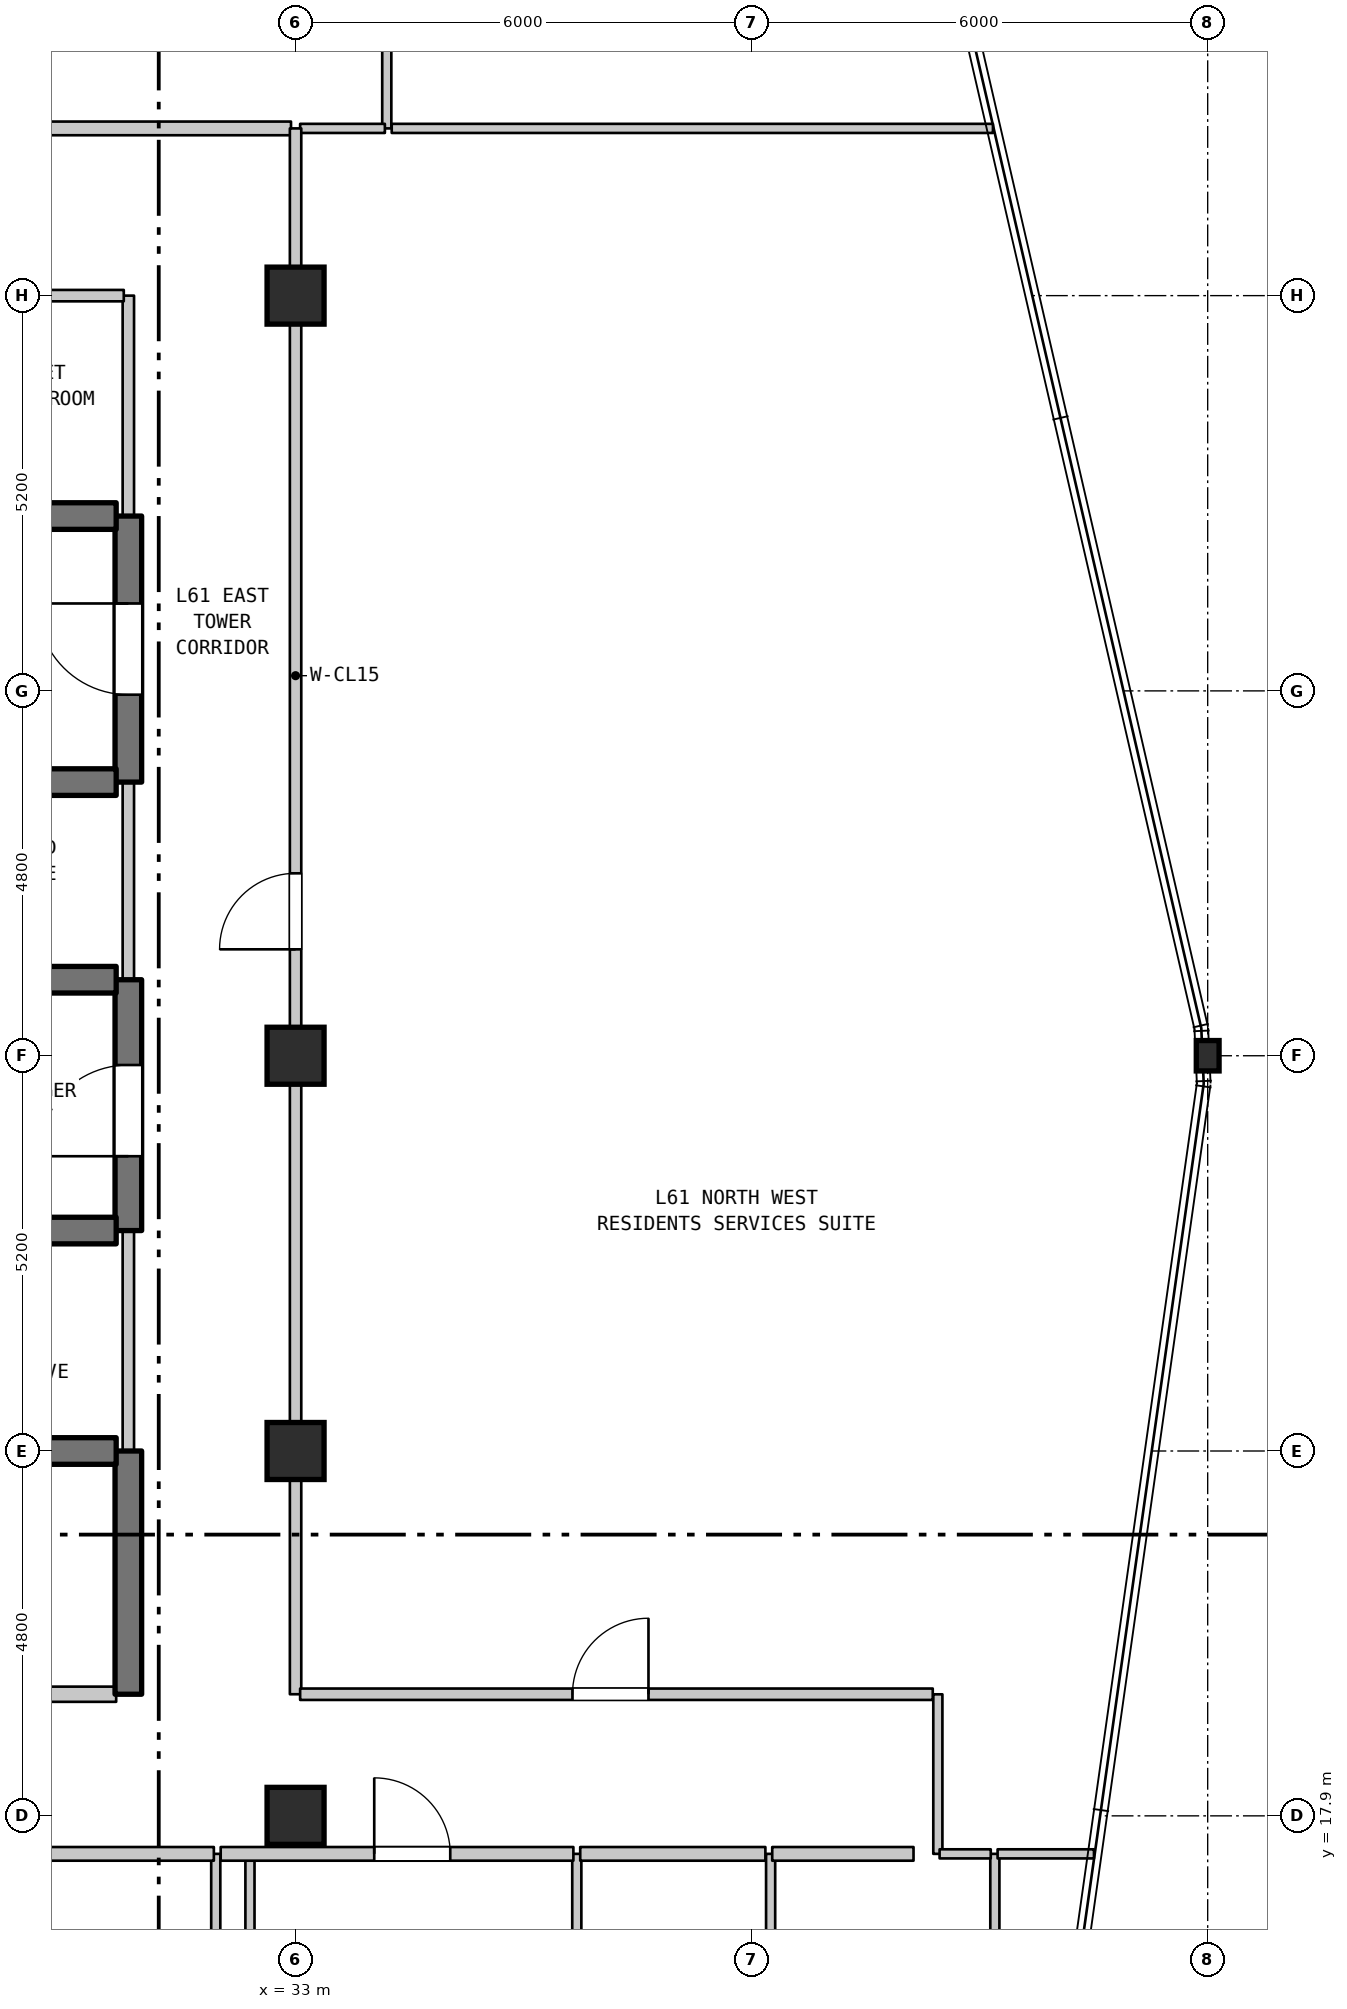
"""IFC4 building model, lengths in metres.
Left out: names, types, materials, properties, quantities, classifications, styles, units other than length and angle.
Written with IfcOpenShell. Run it as: python <this file> out.ifc"""

import sys

from ifc_helpers import new_model, si_unit, direction, frame, frame_2d, origin, origin_2d, place, context, subcontext, project, spatial, rectangle, i_section, extrude, element, fill, save


model = new_model("IFC4")
c1 = context("Model", 3, precision=1e-05, world=origin(), true_north=direction((0.0, 1.0)))
c2 = subcontext(c1, "Body", "Model", "MODEL_VIEW")
j1 = project(units=[si_unit("LENGTHUNIT", "METRE"), si_unit("PLANEANGLEUNIT", "RADIAN")], contexts=[c1])
p1 = place(None, origin())
s1 = spatial("IfcSite", under=j1, at=p1, CompositionType="ELEMENT")
p2 = place(p1, origin())
s2 = spatial("IfcBuilding", under=s1, at=p2, CompositionType="ELEMENT")
p3 = place(p2, frame((0.0, 0.0, 247.3)))
s3 = spatial("IfcBuildingStorey", under=s2, at=p3, CompositionType="ELEMENT", Elevation=247.3)
for number, where, z_axis, x_axis in (
    (1, (33.0, 17.9, 0.0), (0.0, 0.0, 1.0), (1.0, 0.0, 0.0)),
    (2, (33.0, 22.7, 0.0), (0.0, 0.0, 1.0), (1.0, 0.0, 0.0)),
    (3, (33.0, 27.9, 0.0), (0.0, 0.0, 1.0), (1.0, 0.0, 0.0)),
    (4, (33.0, 37.9, 0.0), (0.0, 0.0, 1.0), (1.0, 0.0, 0.0)),
):
    element("IfcColumn", number, at=place(p3, frame(where, z_axis=z_axis, x_axis=x_axis)), inside=s3, PredefinedType="COLUMN", context=c2, shape_type="SweptSolid", body=[
        extrude(rectangle(XDim=0.75, YDim=0.75, at=origin_2d()), origin(), (0.0, 0.0, 1.0), 3.7),
    ])
p4 = place(p3, frame((45.0, 27.9, 0.0), z_axis=(0.0, 0.0, 1.0), x_axis=(1.0, 0.0, 0.0)))
e5 = element("IfcColumn", 5, at=p4, inside=s3, PredefinedType="COLUMN", context=c2, shape_type="SweptSolid", body=[
    extrude(i_section(OverallWidth=0.3, OverallDepth=0.4, WebThickness=0.013, FlangeThickness=0.024, FilletRadius=0.027, at=origin_2d()), origin(), (0.0, 0.0, 1.0), 3.7),
])
p5 = place(p3, frame((30.8, 19.5, 0.0), z_axis=(0.0, 0.0, 1.0), x_axis=(0.0, 1.0, 0.0)))
e6 = element("IfcWall", 6, at=p5, inside=s3, PredefinedType="SHEAR", context=c2, shape_type="SweptSolid", body=[
    extrude(rectangle(XDim=3.2, YDim=0.35, at=frame_2d((1.6, 0.0))), origin(), (0.0, 0.0, 1.0), 3.39),
])
p6 = place(p3, frame((30.8, 22.7, 0.0), z_axis=(0.0, 0.0, 1.0), x_axis=(0.0, 1.0, 0.0)))
e7 = element("IfcWall", 7, at=p6, inside=s3, PredefinedType="STANDARD", context=c2, shape_type="SweptSolid", body=[
    extrude(rectangle(XDim=2.9, YDim=0.15, at=frame_2d((1.45, 0.0))), origin(), (0.0, 0.0, 1.0), 3.39),
])
p7 = place(p3, frame((30.8, 25.6, 0.0), z_axis=(0.0, 0.0, 1.0), x_axis=(0.0, 1.0, 0.0)))
e8 = element("IfcWall", 8, at=p7, inside=s3, PredefinedType="SHEAR", context=c2, shape_type="SweptSolid", body=[
    extrude(rectangle(XDim=3.3, YDim=0.35, at=frame_2d((1.65, 0.0))), origin(), (0.0, 0.0, 1.0), 3.39),
])
p8 = place(p7, frame((0.978, 0.0, 0.0)))
e9 = element("IfcOpeningElement", 9, at=p8, cuts=e8, PredefinedType="OPENING", context=c2, shape_type="SweptSolid", body=[
    extrude(rectangle(XDim=1.2, YDim=2.2, at=frame_2d((0.6, 1.1))), frame((0.0, 0.185, 0.0), z_axis=(0.0, -1.0, 0.0), x_axis=(1.0, 0.0, 0.0)), (0.0, 0.0, 1.0), 0.37),
])
p9 = place(p3, frame((30.8, 28.9, 0.0), z_axis=(0.0, 0.0, 1.0), x_axis=(0.0, 1.0, 0.0)))
e10 = element("IfcWall", 10, at=p9, inside=s3, PredefinedType="STANDARD", context=c2, shape_type="SweptSolid", body=[
    extrude(rectangle(XDim=2.6, YDim=0.15, at=frame_2d((1.3, 0.0))), origin(), (0.0, 0.0, 1.0), 3.39),
])
p10 = place(p3, frame((30.8, 31.5, 0.0), z_axis=(0.0, 0.0, 1.0), x_axis=(0.0, 1.0, 0.0)))
e11 = element("IfcWall", 11, at=p10, inside=s3, PredefinedType="SHEAR", context=c2, shape_type="SweptSolid", body=[
    extrude(rectangle(XDim=3.5, YDim=0.35, at=frame_2d((1.75, 0.0))), origin(), (0.0, 0.0, 1.0), 3.39),
])
p11 = place(p10, frame((1.15, 0.0, 0.0)))
e12 = element("IfcOpeningElement", 12, at=p11, cuts=e11, PredefinedType="OPENING", context=c2, shape_type="SweptSolid", body=[
    extrude(rectangle(XDim=1.2, YDim=2.2, at=frame_2d((0.6, 1.1))), frame((0.0, 0.185, 0.0), z_axis=(0.0, -1.0, 0.0), x_axis=(1.0, 0.0, 0.0)), (0.0, 0.0, 1.0), 0.37),
])
p12 = place(p3, frame((30.8, 35.0, 0.0), z_axis=(0.0, 0.0, 1.0), x_axis=(0.0, 1.0, 0.0)))
e13 = element("IfcWall", 13, at=p12, inside=s3, PredefinedType="STANDARD", context=c2, shape_type="SweptSolid", body=[
    extrude(rectangle(XDim=2.9, YDim=0.15, at=frame_2d((1.45, 0.0))), origin(), (0.0, 0.0, 1.0), 3.39),
])
p13 = place(p3, frame((31.95, 13.62, 0.0), z_axis=(0.0, 0.0, 1.0), x_axis=(0.0, 1.0, 0.0)))
e14 = element("IfcWall", 14, at=p13, inside=s3, PredefinedType="PARTITIONING", context=c2, shape_type="SweptSolid", body=[
    extrude(rectangle(XDim=3.78, YDim=0.12, at=frame_2d((1.89, 0.0))), origin(), (0.0, 0.0, 1.0), 3.39),
])
p14 = place(p3, frame((32.4, 6.71, 0.0), z_axis=(0.0, 0.0, 1.0), x_axis=(0.0, 1.0, 0.0)))
e15 = element("IfcWall", 15, at=p14, inside=s3, PredefinedType="PARTITIONING", context=c2, shape_type="SweptSolid", body=[
    extrude(rectangle(XDim=10.69, YDim=0.12, at=frame_2d((5.345, 0.0))), origin(), (0.0, 0.0, 1.0), 3.39),
])
p15 = place(p3, frame((33.0, 19.5, 0.0), z_axis=(0.0, 0.0, 1.0), x_axis=(0.0, 1.0, 0.0)))
e16 = element("IfcWall", 16, at=p15, inside=s3, PredefinedType="STANDARD", context=c2, shape_type="SweptSolid", body=[
    extrude(rectangle(XDim=8.4, YDim=0.15, at=frame_2d((4.2, 0.0))), origin(), (0.0, 0.0, 1.0), 3.1),
])
p16 = place(p3, frame((34.2, 40.1, 0.0), z_axis=(0.0, 0.0, 1.0), x_axis=(0.0, 1.0, 0.0)))
e17 = element("IfcWall", 17, at=p16, inside=s3, PredefinedType="PARTITIONING", context=c2, shape_type="SweptSolid", body=[
    extrude(rectangle(XDim=13.79, YDim=0.12, at=frame_2d((6.895, 0.0))), origin(), (0.0, 0.0, 1.0), 3.39),
])
p17 = place(p16, frame((1.852, 0.0, 0.0)))
e18 = element("IfcOpeningElement", 18, at=p17, cuts=e17, PredefinedType="OPENING", context=c2, shape_type="SweptSolid", body=[
    extrude(rectangle(XDim=0.9, YDim=2.15, at=frame_2d((0.45, 1.075))), frame((0.0, 0.07, 0.0), z_axis=(0.0, -1.0, 0.0), x_axis=(1.0, 0.0, 0.0)), (0.0, 0.0, 1.0), 0.14),
])
p18 = place(p16, frame((6.45, 0.0, 0.0)))
e19 = element("IfcOpeningElement", 19, at=p18, cuts=e17, PredefinedType="OPENING", context=c2, shape_type="SweptSolid", body=[
    extrude(rectangle(XDim=0.9, YDim=2.15, at=frame_2d((0.45, 1.075))), frame((0.0, 0.07, 0.0), z_axis=(0.0, -1.0, 0.0), x_axis=(1.0, 0.0, 0.0)), (0.0, 0.0, 1.0), 0.14),
])
p19 = place(p16, frame((10.898, 0.0, 0.0)))
e20 = element("IfcOpeningElement", 20, at=p19, cuts=e17, PredefinedType="OPENING", context=c2, shape_type="SweptSolid", body=[
    extrude(rectangle(XDim=0.9, YDim=2.15, at=frame_2d((0.45, 1.075))), frame((0.0, 0.07, 0.0), z_axis=(0.0, -1.0, 0.0), x_axis=(1.0, 0.0, 0.0)), (0.0, 0.0, 1.0), 0.14),
])
for number, where, z_axis, x_axis in (
    (21, (36.7, 13.62, 0.0), (0.0, 0.0, 1.0), (0.0, 1.0, 0.0)),
    (22, (39.25, 13.62, 0.0), (0.0, 0.0, 1.0), (0.0, 1.0, 0.0)),
):
    element("IfcWall", number, at=place(p3, frame(where, z_axis=z_axis, x_axis=x_axis)), inside=s3, PredefinedType="PARTITIONING", context=c2, shape_type="SweptSolid", body=[
        extrude(rectangle(XDim=3.78, YDim=0.12, at=frame_2d((1.89, 0.0))), origin(), (0.0, 0.0, 1.0), 3.39),
    ])
p20 = place(p3, frame((41.45, 17.4, 0.0), z_axis=(0.0, 0.0, 1.0), x_axis=(0.0, 1.0, 0.0)))
e23 = element("IfcWall", 23, at=p20, inside=s3, PredefinedType="PARTITIONING", context=c2, shape_type="SweptSolid", body=[
    extrude(rectangle(XDim=2.099, YDim=0.12, at=frame_2d((1.05, 0.0))), origin(), (0.0, 0.0, 1.0), 3.39),
])
p21 = place(p3, frame((42.2, 13.62, 0.0), z_axis=(0.0, 0.0, 1.0), x_axis=(0.0, 1.0, 0.0)))
e24 = element("IfcWall", 24, at=p21, inside=s3, PredefinedType="PARTITIONING", context=c2, shape_type="SweptSolid", body=[
    extrude(rectangle(XDim=3.78, YDim=0.12, at=frame_2d((1.89, 0.0))), origin(), (0.0, 0.0, 1.0), 3.39),
])
p22 = place(p3, frame((28.424, 17.4, 0.0), z_axis=(0.0, 0.0, 1.0), x_axis=(1.0, 0.0, 0.0)))
e25 = element("IfcWall", 25, at=p22, inside=s3, PredefinedType="STANDARD", context=c2, shape_type="SweptSolid", body=[
    extrude(rectangle(XDim=3.501, YDim=0.18, at=frame_2d((1.75, 0.0))), origin(), (0.0, 0.0, 1.0), 3.39),
])
p23 = place(p3, frame((32.015, 17.4, 0.0), z_axis=(0.0, 0.0, 1.0), x_axis=(1.0, 0.0, 0.0)))
e26 = element("IfcWall", 26, at=p23, inside=s3, PredefinedType="STANDARD", context=c2, shape_type="SweptSolid", body=[
    extrude(rectangle(XDim=4.64, YDim=0.18, at=frame_2d((2.32, 0.0))), origin(), (0.0, 0.0, 1.0), 3.39),
])
p24 = place(p23, frame((2.02, 0.0, 0.0)))
e27 = element("IfcOpeningElement", 27, at=p24, cuts=e26, PredefinedType="OPENING", context=c2, shape_type="SweptSolid", body=[
    extrude(rectangle(XDim=1.0, YDim=2.15, at=frame_2d((0.5, 1.075))), frame((0.0, 0.1, 0.0), z_axis=(0.0, -1.0, 0.0), x_axis=(1.0, 0.0, 0.0)), (0.0, 0.0, 1.0), 0.2),
])
p25 = place(p3, frame((36.745, 17.4, 0.0), z_axis=(0.0, 0.0, 1.0), x_axis=(1.0, 0.0, 0.0)))
e28 = element("IfcWall", 28, at=p25, inside=s3, PredefinedType="STANDARD", context=c2, shape_type="SweptSolid", body=[
    extrude(rectangle(XDim=2.436, YDim=0.18, at=frame_2d((1.218, 0.0))), origin(), (0.0, 0.0, 1.0), 3.39),
])
p26 = place(p3, frame((39.271, 17.4, 0.0), z_axis=(0.0, 0.0, 1.0), x_axis=(1.0, 0.0, 0.0)))
e29 = element("IfcWall", 29, at=p26, inside=s3, PredefinedType="STANDARD", context=c2, shape_type="SweptSolid", body=[
    extrude(rectangle(XDim=1.859, YDim=0.18, at=frame_2d((0.929, 0.0))), origin(), (0.0, 0.0, 1.0), 3.39),
])
p27 = place(p3, frame((41.473, 17.4, 0.0), z_axis=(0.0, 0.0, 1.0), x_axis=(1.0, 0.0, 0.0)))
e30 = element("IfcWall", 30, at=p27, inside=s3, PredefinedType="PARTITIONING", context=c2, shape_type="SweptSolid", body=[
    extrude(rectangle(XDim=0.673, YDim=0.12, at=frame_2d((0.336, 0.0))), origin(), (0.0, 0.0, 1.0), 3.39),
])
p28 = place(p3, frame((42.236, 17.4, 0.0), z_axis=(0.0, 0.0, 1.0), x_axis=(1.0, 0.0, 0.0)))
e31 = element("IfcWall", 31, at=p28, inside=s3, PredefinedType="PARTITIONING", context=c2, shape_type="SweptSolid", body=[
    extrude(rectangle(XDim=1.268, YDim=0.12, at=frame_2d((0.634, 0.0))), origin(), (0.0, 0.0, 1.0), 3.39),
])
p29 = place(p3, frame((25.985, 19.5, 0.0), z_axis=(0.0, 0.0, 1.0), x_axis=(1.0, 0.0, 0.0)))
e32 = element("IfcWall", 32, at=p29, inside=s3, PredefinedType="STANDARD", context=c2, shape_type="SweptSolid", body=[
    extrude(rectangle(XDim=4.655, YDim=0.2, at=frame_2d((2.327, 0.0))), origin(), (0.0, 0.0, 1.0), 3.39),
])
p30 = place(p29, frame((1.845, 0.0, 0.0)))
e33 = element("IfcOpeningElement", 33, at=p30, cuts=e32, PredefinedType="OPENING", context=c2, shape_type="SweptSolid", body=[
    extrude(rectangle(XDim=0.9, YDim=2.15, at=frame_2d((0.45, 1.075))), frame((0.0, 0.11, 0.0), z_axis=(0.0, -1.0, 0.0), x_axis=(1.0, 0.0, 0.0)), (0.0, 0.0, 1.0), 0.22),
])
p31 = place(p3, frame((33.06, 19.5, 0.0), z_axis=(0.0, 0.0, 1.0), x_axis=(1.0, 0.0, 0.0)))
e34 = element("IfcWall", 34, at=p31, inside=s3, PredefinedType="STANDARD", context=c2, shape_type="SweptSolid", body=[
    extrude(rectangle(XDim=8.323, YDim=0.15, at=frame_2d((4.162, 0.0))), origin(), (0.0, 0.0, 1.0), 3.39),
])
p32 = place(p31, frame((3.583, 0.0, 0.0)))
e35 = element("IfcOpeningElement", 35, at=p32, cuts=e34, PredefinedType="OPENING", context=c2, shape_type="SweptSolid", body=[
    extrude(rectangle(XDim=1.0, YDim=2.15, at=frame_2d((0.5, 1.075))), frame((0.0, 0.085, 0.0), z_axis=(0.0, -1.0, 0.0), x_axis=(1.0, 0.0, 0.0)), (0.0, 0.0, 1.0), 0.17),
])
p33 = place(p3, frame((27.46, 22.7, 0.0), z_axis=(0.0, 0.0, 1.0), x_axis=(1.0, 0.0, 0.0)))
e36 = element("IfcWall", 36, at=p33, inside=s3, PredefinedType="SHEAR", context=c2, shape_type="SweptSolid", body=[
    extrude(rectangle(XDim=3.18, YDim=0.35, at=frame_2d((1.59, 0.0))), origin(), (0.0, 0.0, 1.0), 3.39),
])
p34 = place(p3, frame((27.46, 25.6, 0.0), z_axis=(0.0, 0.0, 1.0), x_axis=(1.0, 0.0, 0.0)))
e37 = element("IfcWall", 37, at=p34, inside=s3, PredefinedType="SHEAR", context=c2, shape_type="SweptSolid", body=[
    extrude(rectangle(XDim=3.18, YDim=0.35, at=frame_2d((1.59, 0.0))), origin(), (0.0, 0.0, 1.0), 3.39),
])
p35 = place(p34, frame((1.115, 0.0, 0.0)))
e38 = element("IfcOpeningElement", 38, at=p35, cuts=e37, PredefinedType="OPENING", context=c2, shape_type="SweptSolid", body=[
    extrude(rectangle(XDim=0.95, YDim=2.15, at=frame_2d((0.475, 1.075))), frame((0.0, 0.185, 0.0), z_axis=(0.0, -1.0, 0.0), x_axis=(1.0, 0.0, 0.0)), (0.0, 0.0, 1.0), 0.37),
])
p36 = place(p3, frame((27.46, 28.9, 0.0), z_axis=(0.0, 0.0, 1.0), x_axis=(1.0, 0.0, 0.0)))
e39 = element("IfcWall", 39, at=p36, inside=s3, PredefinedType="SHEAR", context=c2, shape_type="SweptSolid", body=[
    extrude(rectangle(XDim=3.18, YDim=0.35, at=frame_2d((1.59, 0.0))), origin(), (0.0, 0.0, 1.0), 3.39),
])
p37 = place(p36, frame((1.115, 0.0, 0.0)))
e40 = element("IfcOpeningElement", 40, at=p37, cuts=e39, PredefinedType="OPENING", context=c2, shape_type="SweptSolid", body=[
    extrude(rectangle(XDim=0.95, YDim=2.15, at=frame_2d((0.475, 1.075))), frame((0.0, 0.185, 0.0), z_axis=(0.0, -1.0, 0.0), x_axis=(1.0, 0.0, 0.0)), (0.0, 0.0, 1.0), 0.37),
])
p38 = place(p3, frame((27.46, 31.5, 0.0), z_axis=(0.0, 0.0, 1.0), x_axis=(1.0, 0.0, 0.0)))
e41 = element("IfcWall", 41, at=p38, inside=s3, PredefinedType="SHEAR", context=c2, shape_type="SweptSolid", body=[
    extrude(rectangle(XDim=3.18, YDim=0.35, at=frame_2d((1.59, 0.0))), origin(), (0.0, 0.0, 1.0), 3.39),
])
p39 = place(p3, frame((26.645, 35.0, 0.0), z_axis=(0.0, 0.0, 1.0), x_axis=(1.0, 0.0, 0.0)))
e42 = element("IfcWall", 42, at=p39, inside=s3, PredefinedType="SHEAR", context=c2, shape_type="SweptSolid", body=[
    extrude(rectangle(XDim=3.995, YDim=0.35, at=frame_2d((1.998, 0.0))), origin(), (0.0, 0.0, 1.0), 3.39),
])
p40 = place(p39, frame((1.508, 0.0, 0.0)))
e43 = element("IfcOpeningElement", 43, at=p40, cuts=e42, PredefinedType="OPENING", context=c2, shape_type="SweptSolid", body=[
    extrude(rectangle(XDim=0.95, YDim=2.15, at=frame_2d((0.475, 1.075))), frame((0.0, 0.185, 0.0), z_axis=(0.0, -1.0, 0.0), x_axis=(1.0, 0.0, 0.0)), (0.0, 0.0, 1.0), 0.37),
])
p41 = place(p3, frame((26.645, 37.9, 0.0), z_axis=(0.0, 0.0, 1.0), x_axis=(1.0, 0.0, 0.0)))
e44 = element("IfcWall", 44, at=p41, inside=s3, PredefinedType="STANDARD", context=c2, shape_type="SweptSolid", body=[
    extrude(rectangle(XDim=4.095, YDim=0.15, at=frame_2d((2.047, 0.0))), origin(), (0.0, 0.0, 1.0), 2.89),
])
p42 = place(p3, frame((28.895, 40.1, 0.0), z_axis=(0.0, 0.0, 1.0), x_axis=(1.0, 0.0, 0.0)))
e45 = element("IfcWall", 45, at=p42, inside=s3, PredefinedType="STANDARD", context=c2, shape_type="SweptSolid", body=[
    extrude(rectangle(XDim=4.045, YDim=0.18, at=frame_2d((2.022, 0.0))), origin(), (0.0, 0.0, 1.0), 3.39),
])
p43 = place(p3, frame((33.06, 40.1, 0.0), z_axis=(0.0, 0.0, 1.0), x_axis=(1.0, 0.0, 0.0)))
e46 = element("IfcWall", 46, at=p43, inside=s3, PredefinedType="PARTITIONING", context=c2, shape_type="SweptSolid", body=[
    extrude(rectangle(XDim=1.115, YDim=0.12, at=frame_2d((0.558, 0.0))), origin(), (0.0, 0.0, 1.0), 3.39),
])
p44 = place(p3, frame((34.265, 40.1, 0.0), z_axis=(0.0, 0.0, 1.0), x_axis=(1.0, 0.0, 0.0)))
e47 = element("IfcWall", 47, at=p44, inside=s3, PredefinedType="PARTITIONING", context=c2, shape_type="SweptSolid", body=[
    extrude(rectangle(XDim=7.91, YDim=0.12, at=frame_2d((3.955, 0.0))), origin(), (0.0, 0.0, 1.0), 3.39),
])
p45 = place(p3, frame((33.0, 27.9, 0.0), z_axis=(0.0, 0.0, 1.0), x_axis=(0.0, 1.0, 0.0)))
e48 = element("IfcWall", 48, at=p45, inside=s3, PredefinedType="STANDARD", context=c2, shape_type="SweptSolid", body=[
    extrude(rectangle(XDim=10.0, YDim=0.15, at=frame_2d((5.0, 0.0))), origin(), (0.0, 0.0, 1.0), 2.89),
])
p46 = place(p45, frame((1.4, 0.0, 0.0)))
e49 = element("IfcOpeningElement", 49, at=p46, cuts=e48, PredefinedType="OPENING", context=c2, shape_type="SweptSolid", body=[
    extrude(rectangle(XDim=1.0, YDim=2.15, at=frame_2d((0.5, 1.075))), frame((0.0, 0.085, 0.0), z_axis=(0.0, -1.0, 0.0), x_axis=(1.0, 0.0, 0.0)), (0.0, 0.0, 1.0), 0.17),
])
p47 = place(p3, frame((33.0, 37.9, 0.0), z_axis=(0.0, 0.0, 1.0), x_axis=(0.0, 1.0, 0.0)))
e50 = element("IfcWall", 50, at=p47, inside=s3, PredefinedType="STANDARD", context=c2, shape_type="SweptSolid", body=[
    extrude(rectangle(XDim=2.2, YDim=0.15, at=frame_2d((1.1, 0.0))), origin(), (0.0, 0.0, 1.0), 2.79),
])
p48 = place(p8, origin())
e51 = element("IfcDoor", 51, at=p48, inside=s3, OperationType="SINGLE_SWING_LEFT", PredefinedType="DOOR", context=c2, shape_type="SweptSolid", body=[
    extrude(rectangle(XDim=1.2, YDim=2.2, at=frame_2d((0.6, 1.1))), frame((0.0, 0.025, 0.0), z_axis=(0.0, -1.0, 0.0), x_axis=(1.0, 0.0, 0.0)), (0.0, 0.0, 1.0), 0.05),
])
fill(e9, e51)
p49 = place(p11, origin())
e52 = element("IfcDoor", 52, at=p49, inside=s3, OperationType="SINGLE_SWING_RIGHT", PredefinedType="DOOR", context=c2, shape_type="SweptSolid", body=[
    extrude(rectangle(XDim=1.2, YDim=2.2, at=frame_2d((0.6, 1.1))), frame((0.0, 0.025, 0.0), z_axis=(0.0, -1.0, 0.0), x_axis=(1.0, 0.0, 0.0)), (0.0, 0.0, 1.0), 0.05),
])
fill(e12, e52)
p50 = place(p46, origin())
e53 = element("IfcDoor", 53, at=p50, inside=s3, OperationType="SINGLE_SWING_LEFT", PredefinedType="DOOR", context=c2, shape_type="SweptSolid", body=[
    extrude(rectangle(XDim=1.0, YDim=2.15, at=frame_2d((0.5, 1.075))), frame((0.0, 0.025, 0.0), z_axis=(0.0, -1.0, 0.0), x_axis=(1.0, 0.0, 0.0)), (0.0, 0.0, 1.0), 0.05),
])
fill(e49, e53)
p51 = place(p24, origin())
e54 = element("IfcDoor", 54, at=p51, inside=s3, OperationType="SINGLE_SWING_LEFT", PredefinedType="DOOR", context=c2, shape_type="SweptSolid", body=[
    extrude(rectangle(XDim=1.0, YDim=2.15, at=frame_2d((0.5, 1.075))), frame((0.0, 0.025, 0.0), z_axis=(0.0, -1.0, 0.0), x_axis=(1.0, 0.0, 0.0)), (0.0, 0.0, 1.0), 0.05),
])
fill(e27, e54)
p52 = place(p32, origin())
e55 = element("IfcDoor", 55, at=p52, inside=s3, OperationType="SINGLE_SWING_RIGHT", PredefinedType="DOOR", context=c2, shape_type="SweptSolid", body=[
    extrude(rectangle(XDim=1.0, YDim=2.15, at=frame_2d((0.5, 1.075))), frame((0.0, 0.025, 0.0), z_axis=(0.0, -1.0, 0.0), x_axis=(1.0, 0.0, 0.0)), (0.0, 0.0, 1.0), 0.05),
])
fill(e35, e55)
save(model, sys.argv[1])
